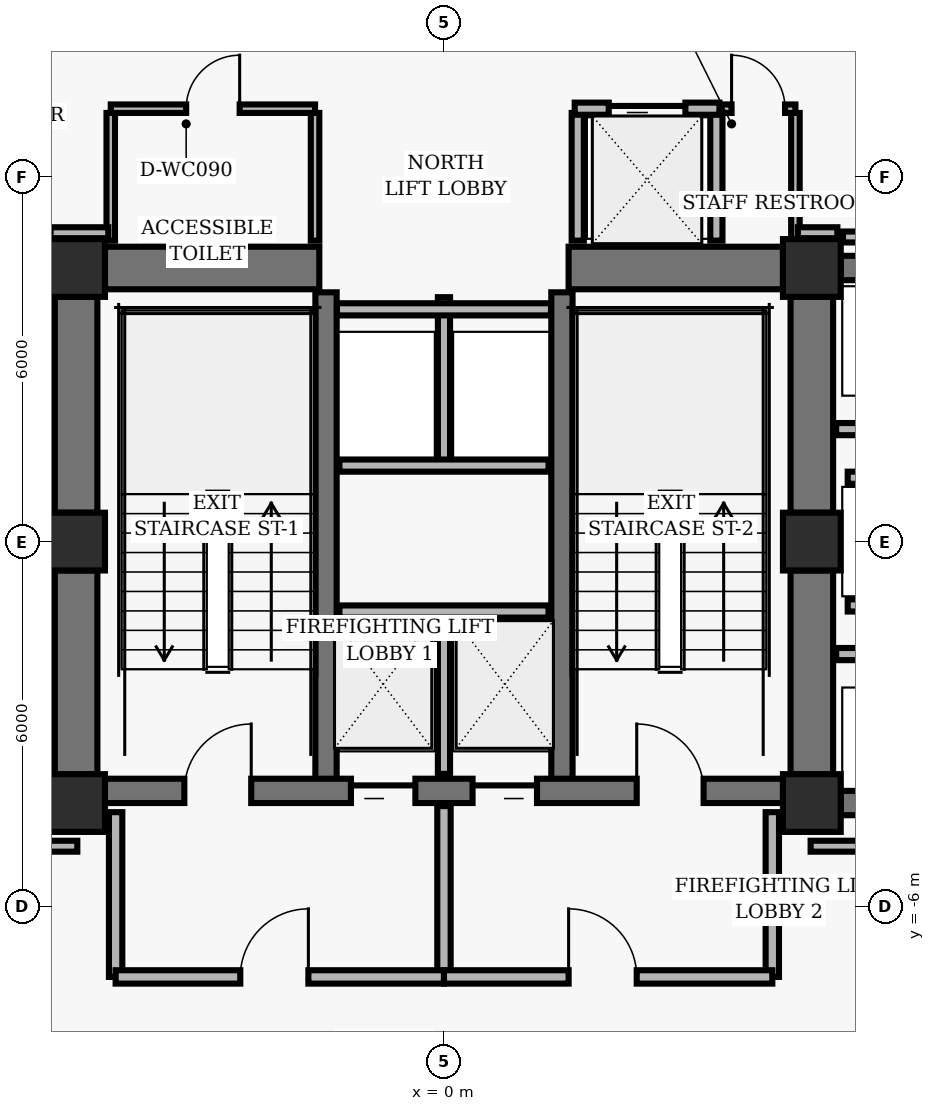
"""IFC4 building model, lengths in metres.
Left out: names, types, materials, properties, quantities, classifications, styles, units other than length and angle.
Written with IfcOpenShell. Run it as: python <this file> out.ifc"""

import sys

from ifc_helpers import new_model, si_unit, direction, frame, frame_2d, origin, origin_2d, place, context, subcontext, project, spatial, rectangle, hollow_rectangle, extrude, element, fill, save


model = new_model("IFC4")
c1 = context("Model", 3, precision=1e-05, world=origin(), true_north=direction((0.0, 1.0)))
c2 = subcontext(c1, "Body", "Model", "MODEL_VIEW")
j1 = project(units=[si_unit("LENGTHUNIT", "METRE"), si_unit("PLANEANGLEUNIT", "RADIAN")], contexts=[c1])
p1 = place(None, origin())
s1 = spatial("IfcSite", under=j1, at=p1, CompositionType="ELEMENT")
p2 = place(p1, origin())
s2 = spatial("IfcBuilding", under=s1, at=p2, CompositionType="ELEMENT")
p3 = place(p2, frame((0.0, 0.0, 42.4)))
s3 = spatial("IfcBuildingStorey", under=s2, at=p3, CompositionType="ELEMENT", Elevation=42.4)
for number, where, z_axis, x_axis in (
    (1, (-6.05, 4.5, 0.0), (0.0, 0.0, 1.0), (1.0, 0.0, 0.0)),
    (2, (6.05, 4.5, 0.0), (0.0, 0.0, 1.0), (1.0, 0.0, 0.0)),
    (3, (-6.05, 0.0, 0.0), (0.0, 0.0, 1.0), (1.0, 0.0, 0.0)),
    (4, (6.05, 0.0, 0.0), (0.0, 0.0, 1.0), (1.0, 0.0, 0.0)),
    (5, (-6.05, -4.3, 0.0), (0.0, 0.0, 1.0), (1.0, 0.0, 0.0)),
    (6, (6.05, -4.3, 0.0), (0.0, 0.0, 1.0), (1.0, 0.0, 0.0)),
):
    element("IfcColumn", number, at=place(p3, frame(where, z_axis=z_axis, x_axis=x_axis)), inside=s3, PredefinedType="COLUMN", context=c2, shape_type="SweptSolid", body=[
        extrude(hollow_rectangle(XDim=0.95, YDim=0.95, WallThickness=0.06, InnerFilletRadius=0.02, OuterFilletRadius=0.04, at=origin_2d()), origin(), (0.0, 0.0, 1.0), 3.36),
    ])
p4 = place(p3, frame((-6.05, 0.475, 0.0), z_axis=(0.0, 0.0, 1.0), x_axis=(0.0, 1.0, 0.0)))
e7 = element("IfcWall", 7, at=p4, inside=s3, PredefinedType="SHEAR", context=c2, shape_type="SweptSolid", body=[
    extrude(rectangle(XDim=3.55, YDim=0.7, at=frame_2d((1.775, 0.0))), origin(), (0.0, 0.0, 1.0), 3.038),
])
p5 = place(p3, frame((-6.05, -3.825, 0.0), z_axis=(0.0, 0.0, 1.0), x_axis=(0.0, 1.0, 0.0)))
e8 = element("IfcWall", 8, at=p5, inside=s3, PredefinedType="SHEAR", context=c2, shape_type="SweptSolid", body=[
    extrude(rectangle(XDim=3.35, YDim=0.7, at=frame_2d((1.675, 0.0))), origin(), (0.0, 0.0, 1.0), 3.038),
])
p6 = place(p3, frame((6.05, 0.475, 0.0), z_axis=(0.0, 0.0, 1.0), x_axis=(0.0, 1.0, 0.0)))
e9 = element("IfcWall", 9, at=p6, inside=s3, PredefinedType="SHEAR", context=c2, shape_type="SweptSolid", body=[
    extrude(rectangle(XDim=3.55, YDim=0.7, at=frame_2d((1.775, 0.0))), origin(), (0.0, 0.0, 1.0), 3.038),
])
p7 = place(p3, frame((6.05, -3.825, 0.0), z_axis=(0.0, 0.0, 1.0), x_axis=(0.0, 1.0, 0.0)))
e10 = element("IfcWall", 10, at=p7, inside=s3, PredefinedType="SHEAR", context=c2, shape_type="SweptSolid", body=[
    extrude(rectangle(XDim=3.35, YDim=0.7, at=frame_2d((1.675, 0.0))), origin(), (0.0, 0.0, 1.0), 3.038),
])
for number, where, z_axis, x_axis in (
    (11, (-1.94, -4.1, 0.0), (0.0, 0.0, 1.0), (0.0, 1.0, 0.0)),
    (12, (1.94, -4.1, 0.0), (0.0, 0.0, 1.0), (0.0, 1.0, 0.0)),
):
    element("IfcWall", number, at=place(p3, frame(where, z_axis=z_axis, x_axis=x_axis)), inside=s3, PredefinedType="SHEAR", context=c2, shape_type="SweptSolid", body=[
        extrude(rectangle(XDim=8.2, YDim=0.35, at=frame_2d((4.1, 0.0))), origin(), (0.0, 0.0, 1.0), 3.038),
    ])
p8 = place(p3, frame((-5.575, -4.1, 0.0), z_axis=(0.0, 0.0, 1.0), x_axis=(1.0, 0.0, 0.0)))
e13 = element("IfcWall", 13, at=p8, inside=s3, PredefinedType="SHEAR", context=c2, shape_type="SweptSolid", body=[
    extrude(rectangle(XDim=11.15, YDim=0.4, at=frame_2d((5.575, 0.0))), origin(), (0.0, 0.0, 1.0), 3.038),
])
p9 = place(p8, frame((1.305, 0.0, 0.0)))
e14 = element("IfcOpeningElement", 14, at=p9, cuts=e13, PredefinedType="OPENING", context=c2, shape_type="SweptSolid", body=[
    extrude(rectangle(XDim=1.1, YDim=2.04, at=frame_2d((0.55, 1.02))), frame((0.0, 0.21, 0.0), z_axis=(0.0, -1.0, 0.0), x_axis=(1.0, 0.0, 0.0)), (0.0, 0.0, 1.0), 0.42),
])
p10 = place(p8, frame((8.745, 0.0, 0.0)))
e15 = element("IfcOpeningElement", 15, at=p10, cuts=e13, PredefinedType="OPENING", context=c2, shape_type="SweptSolid", body=[
    extrude(rectangle(XDim=1.1, YDim=2.04, at=frame_2d((0.55, 1.02))), frame((0.0, 0.21, 0.0), z_axis=(0.0, -1.0, 0.0), x_axis=(1.0, 0.0, 0.0)), (0.0, 0.0, 1.0), 0.42),
])
p11 = place(p8, frame((4.045, 0.0, 0.0)))
e16 = element("IfcOpeningElement", 16, at=p11, cuts=e13, PredefinedType="OPENING", context=c2, shape_type="SweptSolid", body=[
    extrude(rectangle(XDim=1.06, YDim=2.04, at=frame_2d((0.53, 1.02))), frame((0.0, 0.21, 0.0), z_axis=(0.0, -1.0, 0.0), x_axis=(1.0, 0.0, 0.0)), (0.0, 0.0, 1.0), 0.42),
])
p12 = place(p8, frame((6.045, 0.0, 0.0)))
e17 = element("IfcOpeningElement", 17, at=p12, cuts=e13, PredefinedType="OPENING", context=c2, shape_type="SweptSolid", body=[
    extrude(rectangle(XDim=1.06, YDim=2.04, at=frame_2d((0.53, 1.02))), frame((0.0, 0.21, 0.0), z_axis=(0.0, -1.0, 0.0), x_axis=(1.0, 0.0, 0.0)), (0.0, 0.0, 1.0), 0.42),
])
for number, where, z_axis, x_axis in (
    (18, (-5.575, 4.5, 0.0), (0.0, 0.0, 1.0), (1.0, 0.0, 0.0)),
    (19, (2.05, 4.5, 0.0), (0.0, 0.0, 1.0), (1.0, 0.0, 0.0)),
):
    element("IfcWall", number, at=place(p3, frame(where, z_axis=z_axis, x_axis=x_axis)), inside=s3, PredefinedType="SHEAR", context=c2, shape_type="SweptSolid", body=[
        extrude(rectangle(XDim=3.525, YDim=0.7, at=frame_2d((1.762, 0.0))), origin(), (0.0, 0.0, 1.0), 3.038),
    ])
for number, where, z_axis, x_axis in (
    (20, (6.525, 4.5, 0.0), (0.0, 0.0, 1.0), (1.0, 0.0, 0.0)),
    (21, (6.525, -4.3, 0.0), (0.0, 0.0, 1.0), (1.0, 0.0, 0.0)),
):
    element("IfcWall", number, at=place(p3, frame(where, z_axis=z_axis, x_axis=x_axis)), inside=s3, PredefinedType="SHEAR", context=c2, shape_type="SweptSolid", body=[
        extrude(rectangle(XDim=1.95, YDim=0.4, at=frame_2d((0.975, 0.0))), origin(), (0.0, 0.0, 1.0), 3.038),
    ])
p13 = place(p3, frame((0.0, -3.82, 0.0), z_axis=(0.0, 0.0, 1.0), x_axis=(0.0, 1.0, 0.0)))
e22 = element("IfcWall", 22, at=p13, inside=s3, PredefinedType="PARTITIONING", context=c2, shape_type="SweptSolid", body=[
    extrude(rectangle(XDim=2.67, YDim=0.2, at=frame_2d((1.335, 0.0))), origin(), (0.0, 0.0, 1.0), 3.013),
])
p14 = place(p3, frame((-1.72, -1.15, 0.0), z_axis=(0.0, 0.0, 1.0), x_axis=(1.0, 0.0, 0.0)))
e23 = element("IfcWall", 23, at=p14, inside=s3, PredefinedType="PARTITIONING", context=c2, shape_type="SweptSolid", body=[
    extrude(rectangle(XDim=3.44, YDim=0.2, at=frame_2d((1.72, 0.0))), origin(), (0.0, 0.0, 1.0), 3.013),
])
for number, where, z_axis, x_axis in (
    (24, (-5.4, -7.16, 0.0), (0.0, 0.0, 1.0), (0.0, 1.0, 0.0)),
    (25, (5.4, -7.16, 0.0), (0.0, 0.0, 1.0), (0.0, 1.0, 0.0)),
):
    element("IfcWall", number, at=place(p3, frame(where, z_axis=z_axis, x_axis=x_axis)), inside=s3, PredefinedType="PARTITIONING", context=c2, shape_type="SweptSolid", body=[
        extrude(rectangle(XDim=2.71, YDim=0.22, at=frame_2d((1.355, 0.0))), origin(), (0.0, 0.0, 1.0), 3.013),
    ])
p15 = place(p3, frame((0.0, -7.16, 0.0), z_axis=(0.0, 0.0, 1.0), x_axis=(0.0, 1.0, 0.0)))
e26 = element("IfcWall", 26, at=p15, inside=s3, PredefinedType="PARTITIONING", context=c2, shape_type="SweptSolid", body=[
    extrude(rectangle(XDim=2.81, YDim=0.22, at=frame_2d((1.405, 0.0))), origin(), (0.0, 0.0, 1.0), 3.013),
])
p16 = place(p3, frame((-5.4, -7.16, 0.0), z_axis=(0.0, 0.0, 1.0), x_axis=(1.0, 0.0, 0.0)))
e27 = element("IfcWall", 27, at=p16, inside=s3, PredefinedType="PARTITIONING", context=c2, shape_type="SweptSolid", body=[
    extrude(rectangle(XDim=5.4, YDim=0.22, at=frame_2d((2.7, 0.0))), origin(), (0.0, 0.0, 1.0), 3.013),
])
p17 = place(p16, frame((2.05, 0.0, 0.0)))
e28 = element("IfcOpeningElement", 28, at=p17, cuts=e27, PredefinedType="OPENING", context=c2, shape_type="SweptSolid", body=[
    extrude(rectangle(XDim=1.12, YDim=2.02, at=frame_2d((0.56, 1.01))), frame((0.0, 0.12, 0.0), z_axis=(0.0, -1.0, 0.0), x_axis=(1.0, 0.0, 0.0)), (0.0, 0.0, 1.0), 0.24),
])
p18 = place(p3, frame((0.0, -7.16, 0.0), z_axis=(0.0, 0.0, 1.0), x_axis=(1.0, 0.0, 0.0)))
e29 = element("IfcWall", 29, at=p18, inside=s3, PredefinedType="PARTITIONING", context=c2, shape_type="SweptSolid", body=[
    extrude(rectangle(XDim=5.4, YDim=0.22, at=frame_2d((2.7, 0.0))), origin(), (0.0, 0.0, 1.0), 3.013),
])
p19 = place(p18, frame((2.05, 0.0, 0.0)))
e30 = element("IfcOpeningElement", 30, at=p19, cuts=e29, PredefinedType="OPENING", context=c2, shape_type="SweptSolid", body=[
    extrude(rectangle(XDim=1.12, YDim=2.02, at=frame_2d((0.56, 1.01))), frame((0.0, 0.12, 0.0), z_axis=(0.0, -1.0, 0.0), x_axis=(1.0, 0.0, 0.0)), (0.0, 0.0, 1.0), 0.24),
])
p20 = place(p3, frame((0.0, 1.25, 0.0), z_axis=(0.0, 0.0, 1.0), x_axis=(0.0, 1.0, 0.0)))
e31 = element("IfcWall", 31, at=p20, inside=s3, PredefinedType="PARTITIONING", context=c2, shape_type="SweptSolid", body=[
    extrude(rectangle(XDim=2.77, YDim=0.2, at=frame_2d((1.385, 0.0))), origin(), (0.0, 0.0, 1.0), 3.013),
])
p21 = place(p3, frame((-1.72, 1.25, 0.0), z_axis=(0.0, 0.0, 1.0), x_axis=(1.0, 0.0, 0.0)))
e32 = element("IfcWall", 32, at=p21, inside=s3, PredefinedType="PARTITIONING", context=c2, shape_type="SweptSolid", body=[
    extrude(rectangle(XDim=3.44, YDim=0.2, at=frame_2d((1.72, 0.0))), origin(), (0.0, 0.0, 1.0), 3.013),
])
p22 = place(p3, frame((-1.76, 3.82, 0.0), z_axis=(0.0, 0.0, 1.0), x_axis=(1.0, 0.0, 0.0)))
e33 = element("IfcWall", 33, at=p22, inside=s3, PredefinedType="PARTITIONING", context=c2, shape_type="SweptSolid", body=[
    extrude(rectangle(XDim=3.52, YDim=0.2, at=frame_2d((1.76, 0.0))), origin(), (0.0, 0.0, 1.0), 3.013),
])
for number, where, z_axis, x_axis in (
    (34, (2.2, 4.95, 0.0), (0.0, 0.0, 1.0), (0.0, 1.0, 0.0)),
    (35, (4.48, 4.95, 0.0), (0.0, 0.0, 1.0), (0.0, 1.0, 0.0)),
):
    element("IfcWall", number, at=place(p3, frame(where, z_axis=z_axis, x_axis=x_axis)), inside=s3, PredefinedType="PARTITIONING", context=c2, shape_type="SweptSolid", body=[
        extrude(rectangle(XDim=2.1, YDim=0.2, at=frame_2d((1.05, 0.0))), origin(), (0.0, 0.0, 1.0), 3.013),
    ])
p23 = place(p3, frame((2.15, 7.12, 0.0), z_axis=(0.0, 0.0, 1.0), x_axis=(1.0, 0.0, 0.0)))
e36 = element("IfcWall", 36, at=p23, inside=s3, PredefinedType="PARTITIONING", context=c2, shape_type="SweptSolid", body=[
    extrude(rectangle(XDim=2.38, YDim=0.2, at=frame_2d((1.19, 0.0))), origin(), (0.0, 0.0, 1.0), 3.013),
])
p24 = place(p23, frame((0.56, 0.0, 0.0)))
e37 = element("IfcOpeningElement", 37, at=p24, cuts=e36, PredefinedType="OPENING", context=c2, shape_type="SweptSolid", body=[
    extrude(rectangle(XDim=1.26, YDim=2.06, at=frame_2d((0.63, 1.03))), frame((0.0, 0.11, 0.0), z_axis=(0.0, -1.0, 0.0), x_axis=(1.0, 0.0, 0.0)), (0.0, 0.0, 1.0), 0.22),
])
for number, where, z_axis, x_axis in (
    (38, (-5.48, 4.95, 0.0), (0.0, 0.0, 1.0), (0.0, 1.0, 0.0)),
    (39, (-2.12, 4.95, 0.0), (0.0, 0.0, 1.0), (0.0, 1.0, 0.0)),
):
    element("IfcWall", number, at=place(p3, frame(where, z_axis=z_axis, x_axis=x_axis)), inside=s3, PredefinedType="PARTITIONING", context=c2, shape_type="SweptSolid", body=[
        extrude(rectangle(XDim=2.1, YDim=0.14, at=frame_2d((1.05, 0.0))), origin(), (0.0, 0.0, 1.0), 3.013),
    ])
p25 = place(p3, frame((-5.48, 7.12, 0.0), z_axis=(0.0, 0.0, 1.0), x_axis=(1.0, 0.0, 0.0)))
e40 = element("IfcWall", 40, at=p25, inside=s3, PredefinedType="PARTITIONING", context=c2, shape_type="SweptSolid", body=[
    extrude(rectangle(XDim=3.36, YDim=0.14, at=frame_2d((1.68, 0.0))), origin(), (0.0, 0.0, 1.0), 3.013),
])
p26 = place(p25, frame((1.24, 0.0, 0.0)))
e41 = element("IfcOpeningElement", 41, at=p26, cuts=e40, PredefinedType="OPENING", context=c2, shape_type="SweptSolid", body=[
    extrude(rectangle(XDim=0.88, YDim=2.02, at=frame_2d((0.44, 1.01))), frame((0.0, 0.08, 0.0), z_axis=(0.0, -1.0, 0.0), x_axis=(1.0, 0.0, 0.0)), (0.0, 0.0, 1.0), 0.16),
])
p27 = place(p3, frame((5.78, 4.95, 0.0), z_axis=(0.0, 0.0, 1.0), x_axis=(0.0, 1.0, 0.0)))
e42 = element("IfcWall", 42, at=p27, inside=s3, PredefinedType="PARTITIONING", context=c2, shape_type="SweptSolid", body=[
    extrude(rectangle(XDim=2.1, YDim=0.14, at=frame_2d((1.05, 0.0))), origin(), (0.0, 0.0, 1.0), 3.013),
])
p28 = place(p3, frame((4.56, 7.12, 0.0), z_axis=(0.0, 0.0, 1.0), x_axis=(1.0, 0.0, 0.0)))
e43 = element("IfcWall", 43, at=p28, inside=s3, PredefinedType="PARTITIONING", context=c2, shape_type="SweptSolid", body=[
    extrude(rectangle(XDim=1.22, YDim=0.14, at=frame_2d((0.61, 0.0))), origin(), (0.0, 0.0, 1.0), 3.013),
])
p29 = place(p28, frame((0.17, 0.0, 0.0)))
e44 = element("IfcOpeningElement", 44, at=p29, cuts=e43, PredefinedType="OPENING", context=c2, shape_type="SweptSolid", body=[
    extrude(rectangle(XDim=0.88, YDim=2.02, at=frame_2d((0.44, 1.01))), frame((0.0, 0.08, 0.0), z_axis=(0.0, -1.0, 0.0), x_axis=(1.0, 0.0, 0.0)), (0.0, 0.0, 1.0), 0.16),
])
for number, where, z_axis, x_axis in (
    (45, (6.45, -1.85, 0.0), (0.0, 0.0, 1.0), (1.0, 0.0, 0.0)),
    (46, (6.45, 1.85, 0.0), (0.0, 0.0, 1.0), (1.0, 0.0, 0.0)),
):
    element("IfcWall", number, at=place(p3, frame(where, z_axis=z_axis, x_axis=x_axis)), inside=s3, PredefinedType="PARTITIONING", context=c2, shape_type="SweptSolid", body=[
        extrude(rectangle(XDim=2.1, YDim=0.2, at=frame_2d((1.05, 0.0))), origin(), (0.0, 0.0, 1.0), 3.013),
    ])
for number, where, z_axis, x_axis in (
    (47, (6.64, -1.05, 0.0), (0.0, 0.0, 1.0), (1.0, 0.0, 0.0)),
    (48, (6.64, 1.05, 0.0), (0.0, 0.0, 1.0), (1.0, 0.0, 0.0)),
):
    element("IfcWall", number, at=place(p3, frame(where, z_axis=z_axis, x_axis=x_axis)), inside=s3, PredefinedType="PARTITIONING", context=c2, shape_type="SweptSolid", body=[
        extrude(rectangle(XDim=1.91, YDim=0.2, at=frame_2d((0.955, 0.0))), origin(), (0.0, 0.0, 1.0), 3.013),
    ])
for number, where, z_axis, x_axis in (
    (49, (-9.37, -5.01, 0.0), (0.0, 0.0, 1.0), (1.0, 0.0, 0.0)),
    (50, (6.03, -5.01, 0.0), (0.0, 0.0, 1.0), (1.0, 0.0, 0.0)),
):
    element("IfcWall", number, at=place(p3, frame(where, z_axis=z_axis, x_axis=x_axis)), inside=s3, PredefinedType="PARTITIONING", context=c2, shape_type="SweptSolid", body=[
        extrude(rectangle(XDim=3.34, YDim=0.18, at=frame_2d((1.67, 0.0))), origin(), (0.0, 0.0, 1.0), 3.013),
    ])
p30 = place(p3, frame((9.37, 5.01, 0.0), z_axis=(0.0, 0.0, 1.0), x_axis=(-1.0, 0.0, 0.0)))
e51 = element("IfcWall", 51, at=p30, inside=s3, PredefinedType="PARTITIONING", context=c2, shape_type="SweptSolid", body=[
    extrude(rectangle(XDim=2.808, YDim=0.18, at=frame_2d((1.404, 0.0))), origin(), (0.0, 0.0, 1.0), 3.013),
])
p31 = place(p3, frame((6.47, 5.08, 0.0), z_axis=(0.0, 0.0, 1.0), x_axis=(-1.0, 0.0, 0.0)))
e52 = element("IfcWall", 52, at=p31, inside=s3, PredefinedType="PARTITIONING", context=c2, shape_type="SweptSolid", body=[
    extrude(rectangle(XDim=0.65, YDim=0.18, at=frame_2d((0.325, 0.0))), origin(), (0.0, 0.0, 1.0), 3.013),
])
p32 = place(p3, frame((-5.52, 5.08, 0.0), z_axis=(0.0, 0.0, 1.0), x_axis=(-1.0, 0.0, 0.0)))
e53 = element("IfcWall", 53, at=p32, inside=s3, PredefinedType="PARTITIONING", context=c2, shape_type="SweptSolid", body=[
    extrude(rectangle(XDim=0.95, YDim=0.18, at=frame_2d((0.475, 0.0))), origin(), (0.0, 0.0, 1.0), 3.013),
])
p33 = place(p9, origin())
e54 = element("IfcDoor", 54, at=p33, inside=s3, OperationType="SINGLE_SWING_RIGHT", PredefinedType="DOOR", context=c2, shape_type="SweptSolid", body=[
    extrude(rectangle(XDim=1.1, YDim=2.04, at=frame_2d((0.55, 1.02))), frame((0.0, 0.025, 0.0), z_axis=(0.0, -1.0, 0.0), x_axis=(1.0, 0.0, 0.0)), (0.0, 0.0, 1.0), 0.05),
])
fill(e14, e54)
p34 = place(p10, origin())
e55 = element("IfcDoor", 55, at=p34, inside=s3, OperationType="SINGLE_SWING_LEFT", PredefinedType="DOOR", context=c2, shape_type="SweptSolid", body=[
    extrude(rectangle(XDim=1.1, YDim=2.04, at=frame_2d((0.55, 1.02))), frame((0.0, 0.025, 0.0), z_axis=(0.0, -1.0, 0.0), x_axis=(1.0, 0.0, 0.0)), (0.0, 0.0, 1.0), 0.05),
])
fill(e15, e55)
p35 = place(p11, origin())
e56 = element("IfcDoor", 56, at=p35, inside=s3, OperationType="SLIDING_TO_LEFT", PredefinedType="DOOR", context=c2, shape_type="SweptSolid", body=[
    extrude(rectangle(XDim=1.06, YDim=2.04, at=frame_2d((0.53, 1.02))), frame((0.0, 0.025, 0.0), z_axis=(0.0, -1.0, 0.0), x_axis=(1.0, 0.0, 0.0)), (0.0, 0.0, 1.0), 0.05),
])
fill(e16, e56)
p36 = place(p12, origin())
e57 = element("IfcDoor", 57, at=p36, inside=s3, OperationType="SLIDING_TO_RIGHT", PredefinedType="DOOR", context=c2, shape_type="SweptSolid", body=[
    extrude(rectangle(XDim=1.06, YDim=2.04, at=frame_2d((0.53, 1.02))), frame((0.0, 0.025, 0.0), z_axis=(0.0, -1.0, 0.0), x_axis=(1.0, 0.0, 0.0)), (0.0, 0.0, 1.0), 0.05),
])
fill(e17, e57)
p37 = place(p17, origin())
e58 = element("IfcDoor", 58, at=p37, inside=s3, OperationType="SINGLE_SWING_RIGHT", PredefinedType="DOOR", context=c2, shape_type="SweptSolid", body=[
    extrude(rectangle(XDim=1.12, YDim=2.02, at=frame_2d((0.56, 1.01))), frame((0.0, 0.025, 0.0), z_axis=(0.0, -1.0, 0.0), x_axis=(1.0, 0.0, 0.0)), (0.0, 0.0, 1.0), 0.05),
])
fill(e28, e58)
p38 = place(p19, origin())
e59 = element("IfcDoor", 59, at=p38, inside=s3, OperationType="SINGLE_SWING_LEFT", PredefinedType="DOOR", context=c2, shape_type="SweptSolid", body=[
    extrude(rectangle(XDim=1.12, YDim=2.02, at=frame_2d((0.56, 1.01))), frame((0.0, 0.025, 0.0), z_axis=(0.0, -1.0, 0.0), x_axis=(1.0, 0.0, 0.0)), (0.0, 0.0, 1.0), 0.05),
])
fill(e30, e59)
p39 = place(p24, origin())
e60 = element("IfcDoor", 60, at=p39, inside=s3, OperationType="SLIDING_TO_LEFT", PredefinedType="DOOR", context=c2, shape_type="SweptSolid", body=[
    extrude(rectangle(XDim=1.26, YDim=2.06, at=frame_2d((0.63, 1.03))), frame((0.0, 0.025, 0.0), z_axis=(0.0, -1.0, 0.0), x_axis=(1.0, 0.0, 0.0)), (0.0, 0.0, 1.0), 0.05),
])
fill(e37, e60)
p40 = place(p26, origin())
e61 = element("IfcDoor", 61, at=p40, inside=s3, OperationType="SINGLE_SWING_RIGHT", PredefinedType="DOOR", context=c2, shape_type="SweptSolid", body=[
    extrude(rectangle(XDim=0.88, YDim=2.02, at=frame_2d((0.44, 1.01))), frame((0.0, 0.025, 0.0), z_axis=(0.0, -1.0, 0.0), x_axis=(1.0, 0.0, 0.0)), (0.0, 0.0, 1.0), 0.05),
])
fill(e41, e61)
p41 = place(p29, origin())
e62 = element("IfcDoor", 62, at=p41, inside=s3, OperationType="SINGLE_SWING_LEFT", PredefinedType="DOOR", context=c2, shape_type="SweptSolid", body=[
    extrude(rectangle(XDim=0.88, YDim=2.02, at=frame_2d((0.44, 1.01))), frame((0.0, 0.025, 0.0), z_axis=(0.0, -1.0, 0.0), x_axis=(1.0, 0.0, 0.0)), (0.0, 0.0, 1.0), 0.05),
])
fill(e44, e62)
save(model, sys.argv[1])
